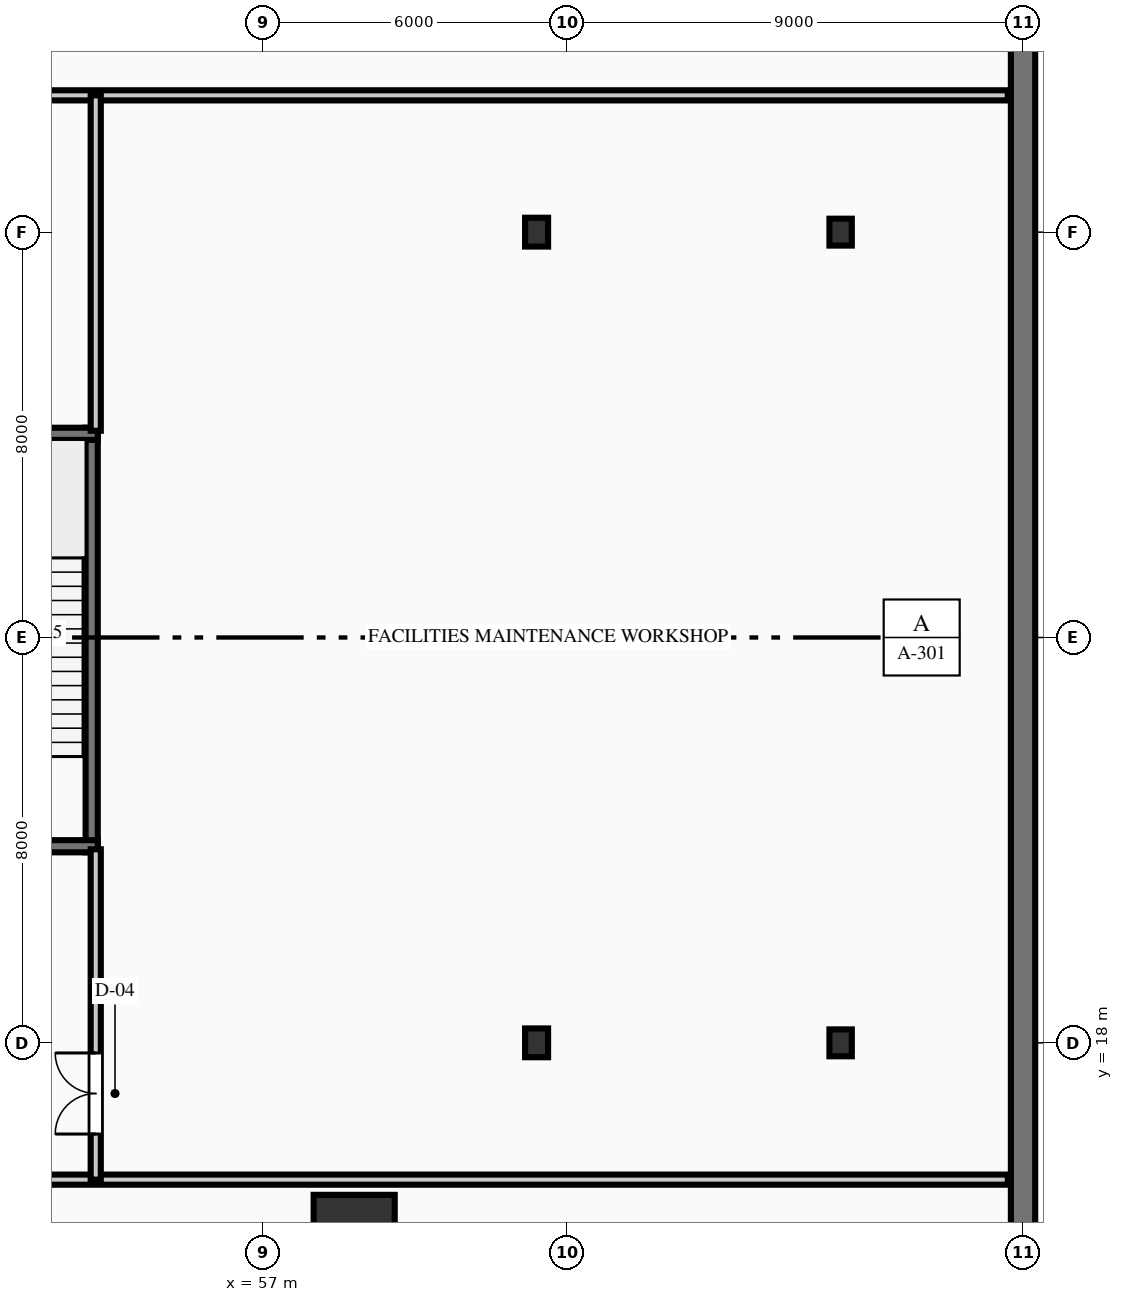
"""IFC4 building model, lengths in metres.
Left out: names, types, materials, properties, quantities, classifications, styles, units other than length and angle.
Written with IfcOpenShell. Run it as: python <this file> out.ifc"""

import sys

from ifc_helpers import new_model, si_unit, direction, frame, frame_2d, origin, origin_2d, place, context, subcontext, project, spatial, rectangle, hollow_rectangle, i_section, extrude, element, fill, save


model = new_model("IFC4")
c1 = context("Model", 3, precision=1e-05, world=origin(), true_north=direction((0.0, 1.0)))
c2 = subcontext(c1, "Body", "Model", "MODEL_VIEW")
j1 = project(units=[si_unit("LENGTHUNIT", "METRE"), si_unit("PLANEANGLEUNIT", "RADIAN")], contexts=[c1])
p1 = place(None, origin())
s1 = spatial("IfcSite", under=j1, at=p1, CompositionType="ELEMENT")
p2 = place(p1, origin())
s2 = spatial("IfcBuilding", under=s1, at=p2, CompositionType="ELEMENT")
p3 = place(p2, frame((0.0, 0.0, -5.2)))
s3 = spatial("IfcBuildingStorey", under=s2, at=p3, CompositionType="ELEMENT", Elevation=-5.2)
p4 = place(p3, frame((53.62, 21.76, -0.3), z_axis=(0.0, 0.0, 1.0), x_axis=(0.0, 1.0, 0.0)))
e1 = element("IfcWall", 1, at=p4, inside=s3, PredefinedType="SHEAR", context=c2, shape_type="SweptSolid", body=[
    extrude(rectangle(XDim=8.38, YDim=0.24, at=frame_2d((4.19, 0.0))), origin(), (0.0, 0.0, 1.0), 5.5),
])
p5 = place(p3, frame((49.76, 21.88, -0.3), z_axis=(0.0, 0.0, 1.0), x_axis=(1.0, 0.0, 0.0)))
e2 = element("IfcWall", 2, at=p5, inside=s3, PredefinedType="SHEAR", context=c2, shape_type="SweptSolid", body=[
    extrude(rectangle(XDim=3.98, YDim=0.24, at=frame_2d((1.99, 0.0))), origin(), (0.0, 0.0, 1.0), 5.5),
])
p6 = place(p5, frame((1.465, 0.0, 0.3)))
e3 = element("IfcOpeningElement", 3, at=p6, cuts=e2, PredefinedType="OPENING", context=c2, shape_type="SweptSolid", body=[
    extrude(rectangle(XDim=1.05, YDim=2.15, at=frame_2d((0.525, 1.075))), frame((0.0, 0.13, 0.0), z_axis=(0.0, -1.0, 0.0), x_axis=(1.0, 0.0, 0.0)), (0.0, 0.0, 1.0), 0.26),
])
p7 = place(p3, frame((49.76, 30.02, -0.3), z_axis=(0.0, 0.0, 1.0), x_axis=(1.0, 0.0, 0.0)))
e4 = element("IfcWall", 4, at=p7, inside=s3, PredefinedType="SHEAR", context=c2, shape_type="SweptSolid", body=[
    extrude(rectangle(XDim=3.98, YDim=0.24, at=frame_2d((1.99, 0.0))), origin(), (0.0, 0.0, 1.0), 5.5),
])
p8 = place(p3, frame((72.0, 4.0, -0.3), z_axis=(0.0, 0.0, 1.0), x_axis=(0.0, 1.0, 0.0)))
e5 = element("IfcWall", 5, at=p8, inside=s3, PredefinedType="SHEAR", context=c2, shape_type="SweptSolid", body=[
    extrude(rectangle(XDim=44.0, YDim=0.48, at=frame_2d((22.0, 0.0))), origin(), (0.0, 0.0, 1.0), 5.5),
])
p9 = place(p3, frame((58.8, 14.2, -0.3), z_axis=(0.0, 0.0, 1.0), x_axis=(1.0, 0.0, 0.0)))
e6 = element("IfcColumn", 6, at=p9, inside=s3, PredefinedType="COLUMN", context=c2, shape_type="SweptSolid", body=[
    extrude(hollow_rectangle(XDim=1.6, YDim=1.6, WallThickness=0.08, at=origin_2d()), origin(), (0.0, 0.0, 1.0), 5.5),
])
for number, where, z_axis, x_axis in (
    (7, (62.4, 18.0, -0.3), (0.0, 0.0, 1.0), (1.0, 0.0, 0.0)),
    (8, (62.4, 34.0, -0.3), (0.0, 0.0, 1.0), (1.0, 0.0, 0.0)),
):
    element("IfcColumn", number, at=place(p3, frame(where, z_axis=z_axis, x_axis=x_axis)), inside=s3, PredefinedType="COLUMN", context=c2, shape_type="SweptSolid", body=[
        extrude(i_section(OverallWidth=0.454, OverallDepth=0.569, WebThickness=0.078, FlangeThickness=0.125, at=origin_2d()), origin(), (0.0, 0.0, 1.0), 5.5),
    ])
for number, where, z_axis, x_axis in (
    (9, (68.4, 18.0, -0.3), (0.0, 0.0, 1.0), (1.0, 0.0, 0.0)),
    (10, (68.4, 34.0, -0.3), (0.0, 0.0, 1.0), (1.0, 0.0, 0.0)),
):
    element("IfcColumn", number, at=place(p3, frame(where, z_axis=z_axis, x_axis=x_axis)), inside=s3, PredefinedType="COLUMN", context=c2, shape_type="SweptSolid", body=[
        extrude(i_section(OverallWidth=0.442, OverallDepth=0.531, WebThickness=0.066, FlangeThickness=0.106, at=origin_2d()), origin(), (0.0, 0.0, 1.0), 5.5),
    ])
p10 = place(p3, frame((0.3, 15.3, 0.0), z_axis=(0.0, 0.0, 1.0), x_axis=(1.0, 0.0, 0.0)))
e11 = element("IfcWall", 11, at=p10, inside=s3, PredefinedType="PARTITIONING", context=c2, shape_type="SweptSolid", body=[
    extrude(rectangle(XDim=71.4, YDim=0.2, at=frame_2d((35.7, 0.0))), origin(), (0.0, 0.0, 1.0), 3.935),
])
p11 = place(p10, frame((23.9, 0.0, 0.0)))
e12 = element("IfcOpeningElement", 12, at=p11, cuts=e11, PredefinedType="OPENING", context=c2, shape_type="SweptSolid", body=[
    extrude(rectangle(XDim=1.6, YDim=2.2, at=frame_2d((0.8, 1.1))), frame((0.0, 0.11, 0.0), z_axis=(0.0, -1.0, 0.0), x_axis=(1.0, 0.0, 0.0)), (0.0, 0.0, 1.0), 0.22),
])
p12 = place(p10, frame((45.9, 0.0, 0.0)))
e13 = element("IfcOpeningElement", 13, at=p12, cuts=e11, PredefinedType="OPENING", context=c2, shape_type="SweptSolid", body=[
    extrude(rectangle(XDim=1.6, YDim=2.2, at=frame_2d((0.8, 1.1))), frame((0.0, 0.11, 0.0), z_axis=(0.0, -1.0, 0.0), x_axis=(1.0, 0.0, 0.0)), (0.0, 0.0, 1.0), 0.22),
])
p13 = place(p3, frame((0.3, 36.7, 0.0), z_axis=(0.0, 0.0, 1.0), x_axis=(1.0, 0.0, 0.0)))
e14 = element("IfcWall", 14, at=p13, inside=s3, PredefinedType="PARTITIONING", context=c2, shape_type="SweptSolid", body=[
    extrude(rectangle(XDim=71.4, YDim=0.2, at=frame_2d((35.7, 0.0))), origin(), (0.0, 0.0, 1.0), 4.84),
])
p14 = place(p13, frame((24.15, 0.0, 0.0)))
e15 = element("IfcOpeningElement", 15, at=p14, cuts=e14, PredefinedType="OPENING", context=c2, shape_type="SweptSolid", body=[
    extrude(rectangle(XDim=1.1, YDim=2.15, at=frame_2d((0.55, 1.075))), frame((0.0, 0.11, 0.0), z_axis=(0.0, -1.0, 0.0), x_axis=(1.0, 0.0, 0.0)), (0.0, 0.0, 1.0), 0.22),
])
p15 = place(p13, frame((36.95, 0.0, 0.0)))
e16 = element("IfcOpeningElement", 16, at=p15, cuts=e14, PredefinedType="OPENING", context=c2, shape_type="SweptSolid", body=[
    extrude(rectangle(XDim=0.9, YDim=2.15, at=frame_2d((0.45, 1.075))), frame((0.0, 0.11, 0.0), z_axis=(0.0, -1.0, 0.0), x_axis=(1.0, 0.0, 0.0)), (0.0, 0.0, 1.0), 0.22),
])
p16 = place(p13, frame((40.06, 0.0, 0.0)))
e17 = element("IfcOpeningElement", 17, at=p16, cuts=e14, PredefinedType="OPENING", context=c2, shape_type="SweptSolid", body=[
    extrude(rectangle(XDim=1.0, YDim=2.15, at=frame_2d((0.5, 1.075))), frame((0.0, 0.11, 0.0), z_axis=(0.0, -1.0, 0.0), x_axis=(1.0, 0.0, 0.0)), (0.0, 0.0, 1.0), 0.22),
])
p17 = place(p13, frame((47.15, 0.0, 0.0)))
e18 = element("IfcOpeningElement", 18, at=p17, cuts=e14, PredefinedType="OPENING", context=c2, shape_type="SweptSolid", body=[
    extrude(rectangle(XDim=1.1, YDim=2.15, at=frame_2d((0.55, 1.075))), frame((0.0, 0.11, 0.0), z_axis=(0.0, -1.0, 0.0), x_axis=(1.0, 0.0, 0.0)), (0.0, 0.0, 1.0), 0.22),
])
p18 = place(p3, frame((53.7, 15.3, 0.0), z_axis=(0.0, 0.0, 1.0), x_axis=(0.0, 1.0, 0.0)))
e19 = element("IfcWall", 19, at=p18, inside=s3, PredefinedType="PARTITIONING", context=c2, shape_type="SweptSolid", body=[
    extrude(rectangle(XDim=6.52, YDim=0.2, at=frame_2d((3.26, 0.0))), origin(), (0.0, 0.0, 1.0), 4.84),
])
p19 = place(p18, frame((0.9, 0.0, 0.0)))
e20 = element("IfcOpeningElement", 20, at=p19, cuts=e19, PredefinedType="OPENING", context=c2, shape_type="SweptSolid", body=[
    extrude(rectangle(XDim=1.6, YDim=2.2, at=frame_2d((0.8, 1.1))), frame((0.0, 0.11, 0.0), z_axis=(0.0, -1.0, 0.0), x_axis=(1.0, 0.0, 0.0)), (0.0, 0.0, 1.0), 0.22),
])
p20 = place(p3, frame((53.7, 30.08, 0.0), z_axis=(0.0, 0.0, 1.0), x_axis=(0.0, 1.0, 0.0)))
e21 = element("IfcWall", 21, at=p20, inside=s3, PredefinedType="PARTITIONING", context=c2, shape_type="SweptSolid", body=[
    extrude(rectangle(XDim=6.62, YDim=0.2, at=frame_2d((3.31, 0.0))), origin(), (0.0, 0.0, 1.0), 4.84),
])
p21 = place(p19, origin())
e22 = element("IfcDoor", 22, at=p21, inside=s3, OperationType="DOUBLE_DOOR_SINGLE_SWING", PredefinedType="DOOR", context=c2, shape_type="SweptSolid", body=[
    extrude(rectangle(XDim=1.6, YDim=2.2, at=frame_2d((0.8, 1.1))), frame((0.0, 0.025, 0.0), z_axis=(0.0, -1.0, 0.0), x_axis=(1.0, 0.0, 0.0)), (0.0, 0.0, 1.0), 0.05),
])
fill(e20, e22)
save(model, sys.argv[1])
